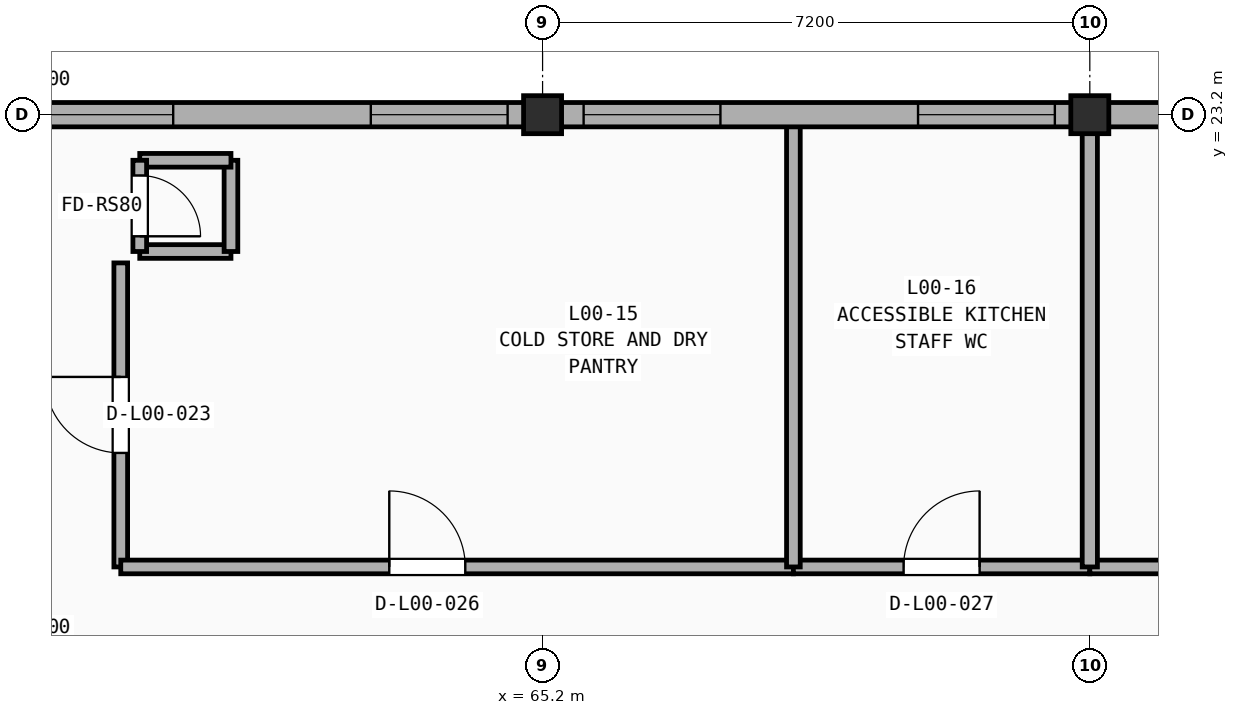
"""IFC4 building model, lengths in metres.
Left out: names, types, materials, properties, quantities, classifications, styles, units other than length and angle.
Written with IfcOpenShell. Run it as: python <this file> out.ifc"""

import sys

from ifc_helpers import new_model, si_unit, direction, frame, frame_2d, origin, origin_2d, place, context, subcontext, project, spatial, rectangle, extrude, element, fill, save


model = new_model("IFC4")
c1 = context("Model", 3, precision=1e-05, world=origin(), true_north=direction((0.0, 1.0)))
c2 = subcontext(c1, "Body", "Model", "MODEL_VIEW")
j1 = project(units=[si_unit("LENGTHUNIT", "METRE"), si_unit("PLANEANGLEUNIT", "RADIAN")], contexts=[c1])
p1 = place(None, origin())
s1 = spatial("IfcSite", under=j1, at=p1, CompositionType="ELEMENT")
p2 = place(p1, origin())
s2 = spatial("IfcBuilding", under=s1, at=p2, CompositionType="ELEMENT")
p3 = place(p2, origin())
s3 = spatial("IfcBuildingStorey", under=s2, at=p3, CompositionType="ELEMENT", Elevation=0.0)
for number, where, z_axis, x_axis in (
    (1, (65.2, 23.2, 0.0), (0.0, 0.0, 1.0), (1.0, 0.0, 0.0)),
    (2, (72.4, 23.2, 0.0), (0.0, 0.0, 1.0), (1.0, 0.0, 0.0)),
):
    element("IfcColumn", number, at=place(p3, frame(where, z_axis=z_axis, x_axis=x_axis)), inside=s3, PredefinedType="COLUMN", context=c2, shape_type="SweptSolid", body=[
        extrude(rectangle(XDim=0.5, YDim=0.5, at=origin_2d()), origin(), (0.0, 0.0, 1.0), 5.4),
    ])
p4 = place(p3, frame((59.65, 17.25, 0.0), z_axis=(0.0, 0.0, 1.0), x_axis=(0.0, 1.0, 0.0)))
e3 = element("IfcWall", 3, at=p4, inside=s3, PredefinedType="PARTITIONING", context=c2, shape_type="SweptSolid", body=[
    extrude(rectangle(XDim=4.0, YDim=0.18, at=frame_2d((2.0, 0.0))), origin(), (0.0, 0.0, 1.0), 5.04),
])
p5 = place(p4, frame((1.5, 0.0, -0.01)))
e4 = element("IfcOpeningElement", 4, at=p5, cuts=e3, PredefinedType="OPENING", context=c2, shape_type="SweptSolid", body=[
    extrude(rectangle(XDim=1.0, YDim=2.16, at=frame_2d((0.5, 1.08))), frame((0.0, 0.1, 0.0), z_axis=(0.0, -1.0, 0.0), x_axis=(1.0, 0.0, 0.0)), (0.0, 0.0, 1.0), 0.2),
])
p6 = place(p3, frame((59.65, 17.25, 0.0), z_axis=(0.0, 0.0, 1.0), x_axis=(1.0, 0.0, 0.0)))
e5 = element("IfcWall", 5, at=p6, inside=s3, PredefinedType="PARTITIONING", context=c2, shape_type="SweptSolid", body=[
    extrude(rectangle(XDim=8.85, YDim=0.18, at=frame_2d((4.425, 0.0))), origin(), (0.0, 0.0, 1.0), 4.39),
])
p7 = place(p6, frame((3.533, 0.0, -0.01)))
e6 = element("IfcOpeningElement", 6, at=p7, cuts=e5, PredefinedType="OPENING", context=c2, shape_type="SweptSolid", body=[
    extrude(rectangle(XDim=1.0, YDim=2.16, at=frame_2d((0.5, 1.08))), frame((0.0, 0.1, 0.0), z_axis=(0.0, -1.0, 0.0), x_axis=(1.0, 0.0, 0.0)), (0.0, 0.0, 1.0), 0.2),
])
p8 = place(p3, frame((68.5, 17.25, 0.0), z_axis=(0.0, 0.0, 1.0), x_axis=(1.0, 0.0, 0.0)))
e7 = element("IfcWall", 7, at=p8, inside=s3, PredefinedType="PARTITIONING", context=c2, shape_type="SweptSolid", body=[
    extrude(rectangle(XDim=3.9, YDim=0.18, at=frame_2d((1.95, 0.0))), origin(), (0.0, 0.0, 1.0), 4.39),
])
p9 = place(p8, frame((1.45, 0.0, -0.01)))
e8 = element("IfcOpeningElement", 8, at=p9, cuts=e7, PredefinedType="OPENING", context=c2, shape_type="SweptSolid", body=[
    extrude(rectangle(XDim=1.0, YDim=2.16, at=frame_2d((0.5, 1.08))), frame((0.0, 0.1, 0.0), z_axis=(0.0, -1.0, 0.0), x_axis=(1.0, 0.0, 0.0)), (0.0, 0.0, 1.0), 0.2),
])
p10 = place(p3, frame((72.4, 17.25, 0.0), z_axis=(0.0, 0.0, 1.0), x_axis=(1.0, 0.0, 0.0)))
e9 = element("IfcWall", 9, at=p10, inside=s3, PredefinedType="PARTITIONING", context=c2, shape_type="SweptSolid", body=[
    extrude(rectangle(XDim=14.55, YDim=0.18, at=frame_2d((7.275, 0.0))), origin(), (0.0, 0.0, 1.0), 4.39),
])
p11 = place(p10, frame((5.34, 0.0, -0.01)))
e10 = element("IfcOpeningElement", 10, at=p11, cuts=e9, PredefinedType="OPENING", context=c2, shape_type="SweptSolid", body=[
    extrude(rectangle(XDim=1.2, YDim=2.21, at=frame_2d((0.6, 1.105))), frame((0.0, 0.1, 0.0), z_axis=(0.0, -1.0, 0.0), x_axis=(1.0, 0.0, 0.0)), (0.0, 0.0, 1.0), 0.2),
])
p12 = place(p3, frame((68.5, 17.25, 0.0), z_axis=(0.0, 0.0, 1.0), x_axis=(0.0, 1.0, 0.0)))
e11 = element("IfcWall", 11, at=p12, inside=s3, PredefinedType="PARTITIONING", context=c2, shape_type="SweptSolid", body=[
    extrude(rectangle(XDim=5.8, YDim=0.18, at=frame_2d((2.9, 0.0))), origin(), (0.0, 0.0, 1.0), 4.64),
])
p13 = place(p3, frame((72.4, 17.25, 0.0), z_axis=(0.0, 0.0, 1.0), x_axis=(0.0, 1.0, 0.0)))
e12 = element("IfcWall", 12, at=p13, inside=s3, PredefinedType="PARTITIONING", context=c2, shape_type="SweptSolid", body=[
    extrude(rectangle(XDim=5.8, YDim=0.2, at=frame_2d((2.9, 0.0))), origin(), (0.0, 0.0, 1.0), 4.39),
])
p14 = place(p3, frame((65.2, 23.2, 0.0), z_axis=(0.0, 0.0, 1.0), x_axis=(-1.0, 0.0, 0.0)))
e13 = element("IfcWall", 13, at=p14, inside=s3, PredefinedType="SOLIDWALL", context=c2, shape_type="SweptSolid", body=[
    extrude(rectangle(XDim=7.2, YDim=0.32, at=frame_2d((3.6, 0.0))), origin(), (0.0, 0.0, 1.0), 4.39),
])
p15 = place(p14, frame((0.46, 0.0, 0.9)))
e14 = element("IfcOpeningElement", 14, at=p15, cuts=e13, PredefinedType="OPENING", context=c2, shape_type="SweptSolid", body=[
    extrude(rectangle(XDim=1.8, YDim=2.2, at=frame_2d((0.9, 1.1))), frame((0.0, 0.17, 0.0), z_axis=(0.0, -1.0, 0.0), x_axis=(1.0, 0.0, 0.0)), (0.0, 0.0, 1.0), 0.34),
])
p16 = place(p14, frame((4.86, 0.0, 0.9)))
e15 = element("IfcOpeningElement", 15, at=p16, cuts=e13, PredefinedType="OPENING", context=c2, shape_type="SweptSolid", body=[
    extrude(rectangle(XDim=1.8, YDim=2.2, at=frame_2d((0.9, 1.1))), frame((0.0, 0.17, 0.0), z_axis=(0.0, -1.0, 0.0), x_axis=(1.0, 0.0, 0.0)), (0.0, 0.0, 1.0), 0.34),
])
p17 = place(p3, frame((72.4, 23.2, 0.0), z_axis=(0.0, 0.0, 1.0), x_axis=(-1.0, 0.0, 0.0)))
e16 = element("IfcWall", 16, at=p17, inside=s3, PredefinedType="SOLIDWALL", context=c2, shape_type="SweptSolid", body=[
    extrude(rectangle(XDim=7.2, YDim=0.32, at=frame_2d((3.6, 0.0))), origin(), (0.0, 0.0, 1.0), 4.39),
])
p18 = place(p17, frame((0.46, 0.0, 0.9)))
e17 = element("IfcOpeningElement", 17, at=p18, cuts=e16, PredefinedType="OPENING", context=c2, shape_type="SweptSolid", body=[
    extrude(rectangle(XDim=1.8, YDim=2.2, at=frame_2d((0.9, 1.1))), frame((0.0, 0.17, 0.0), z_axis=(0.0, -1.0, 0.0), x_axis=(1.0, 0.0, 0.0)), (0.0, 0.0, 1.0), 0.34),
])
p19 = place(p17, frame((4.86, 0.0, 0.9)))
e18 = element("IfcOpeningElement", 18, at=p19, cuts=e16, PredefinedType="OPENING", context=c2, shape_type="SweptSolid", body=[
    extrude(rectangle(XDim=1.8, YDim=2.2, at=frame_2d((0.9, 1.1))), frame((0.0, 0.17, 0.0), z_axis=(0.0, -1.0, 0.0), x_axis=(1.0, 0.0, 0.0)), (0.0, 0.0, 1.0), 0.34),
])
p20 = place(p3, frame((79.6, 23.2, 0.0), z_axis=(0.0, 0.0, 1.0), x_axis=(-1.0, 0.0, 0.0)))
e19 = element("IfcWall", 19, at=p20, inside=s3, PredefinedType="SOLIDWALL", context=c2, shape_type="SweptSolid", body=[
    extrude(rectangle(XDim=7.2, YDim=0.32, at=frame_2d((3.6, 0.0))), origin(), (0.0, 0.0, 1.0), 4.39),
])
p21 = place(p20, frame((2.6, 0.0, -0.01)))
e20 = element("IfcOpeningElement", 20, at=p21, cuts=e19, PredefinedType="OPENING", context=c2, shape_type="SweptSolid", body=[
    extrude(rectangle(XDim=2.0, YDim=2.41, at=frame_2d((1.0, 1.205))), frame((0.0, 0.17, 0.0), z_axis=(0.0, -1.0, 0.0), x_axis=(1.0, 0.0, 0.0)), (0.0, 0.0, 1.0), 0.34),
])
for number, where, z_axis, x_axis in (
    (21, (59.9, 21.4, 0.0), (0.0, 0.0, 1.0), (1.0, 0.0, 0.0)),
    (22, (61.1, 21.4, 0.0), (0.0, 0.0, 1.0), (0.0, 1.0, 0.0)),
    (23, (61.1, 22.6, 0.0), (0.0, 0.0, 1.0), (-1.0, 0.0, 0.0)),
):
    element("IfcWall", number, at=place(p3, frame(where, z_axis=z_axis, x_axis=x_axis)), inside=s3, PredefinedType="SOLIDWALL", context=c2, shape_type="SweptSolid", body=[
        extrude(rectangle(XDim=1.2, YDim=0.18, at=frame_2d((0.6, 0.0))), origin(), (0.0, 0.0, 1.0), 5.07),
    ])
p22 = place(p3, frame((59.9, 22.6, 0.0), z_axis=(0.0, 0.0, 1.0), x_axis=(0.0, -1.0, 0.0)))
e24 = element("IfcWall", 24, at=p22, inside=s3, PredefinedType="SOLIDWALL", context=c2, shape_type="SweptSolid", body=[
    extrude(rectangle(XDim=1.2, YDim=0.18, at=frame_2d((0.6, 0.0))), origin(), (0.0, 0.0, 1.0), 5.07),
])
p23 = place(p22, frame((0.2, 0.0, -0.01)))
e25 = element("IfcOpeningElement", 25, at=p23, cuts=e24, PredefinedType="OPENING", context=c2, shape_type="SweptSolid", body=[
    extrude(rectangle(XDim=0.8, YDim=2.06, at=frame_2d((0.4, 1.03))), frame((0.0, 0.1, 0.0), z_axis=(0.0, -1.0, 0.0), x_axis=(1.0, 0.0, 0.0)), (0.0, 0.0, 1.0), 0.2),
])
p24 = place(p5, frame((0.0, 0.0, 0.01)))
e26 = element("IfcDoor", 26, at=p24, inside=s3, OperationType="SINGLE_SWING_RIGHT", PredefinedType="DOOR", context=c2, shape_type="SweptSolid", body=[
    extrude(rectangle(XDim=1.0, YDim=2.15, at=frame_2d((0.5, 1.075))), frame((0.0, 0.025, 0.0), z_axis=(0.0, -1.0, 0.0), x_axis=(1.0, 0.0, 0.0)), (0.0, 0.0, 1.0), 0.05),
])
fill(e4, e26)
p25 = place(p7, frame((0.0, 0.0, 0.01)))
e27 = element("IfcDoor", 27, at=p25, inside=s3, OperationType="SINGLE_SWING_LEFT", PredefinedType="DOOR", context=c2, shape_type="SweptSolid", body=[
    extrude(rectangle(XDim=1.0, YDim=2.15, at=frame_2d((0.5, 1.075))), frame((0.0, 0.025, 0.0), z_axis=(0.0, -1.0, 0.0), x_axis=(1.0, 0.0, 0.0)), (0.0, 0.0, 1.0), 0.05),
])
fill(e6, e27)
p26 = place(p9, frame((1.0, 0.0, 0.01), z_axis=(0.0, 0.0, 1.0), x_axis=(-1.0, 0.0, 0.0)))
e28 = element("IfcDoor", 28, at=p26, inside=s3, OperationType="SINGLE_SWING_RIGHT", PredefinedType="DOOR", context=c2, shape_type="SweptSolid", body=[
    extrude(rectangle(XDim=1.0, YDim=2.15, at=frame_2d((0.5, 1.075))), frame((0.0, 0.025, 0.0), z_axis=(0.0, -1.0, 0.0), x_axis=(1.0, 0.0, 0.0)), (0.0, 0.0, 1.0), 0.05),
])
fill(e8, e28)
p27 = place(p15, origin())
e29 = element("IfcWindow", 29, at=p27, inside=s3, PartitioningType="DOUBLE_PANEL_VERTICAL", PredefinedType="WINDOW", context=c2, shape_type="SweptSolid", body=[
    extrude(rectangle(XDim=1.8, YDim=2.2, at=frame_2d((0.9, 1.1))), frame((0.0, 0.03, 0.0), z_axis=(0.0, -1.0, 0.0), x_axis=(1.0, 0.0, 0.0)), (0.0, 0.0, 1.0), 0.06),
])
fill(e14, e29)
p28 = place(p16, origin())
e30 = element("IfcWindow", 30, at=p28, inside=s3, PartitioningType="DOUBLE_PANEL_VERTICAL", PredefinedType="WINDOW", context=c2, shape_type="SweptSolid", body=[
    extrude(rectangle(XDim=1.8, YDim=2.2, at=frame_2d((0.9, 1.1))), frame((0.0, 0.03, 0.0), z_axis=(0.0, -1.0, 0.0), x_axis=(1.0, 0.0, 0.0)), (0.0, 0.0, 1.0), 0.06),
])
fill(e15, e30)
p29 = place(p18, origin())
e31 = element("IfcWindow", 31, at=p29, inside=s3, PartitioningType="DOUBLE_PANEL_VERTICAL", PredefinedType="WINDOW", context=c2, shape_type="SweptSolid", body=[
    extrude(rectangle(XDim=1.8, YDim=2.2, at=frame_2d((0.9, 1.1))), frame((0.0, 0.03, 0.0), z_axis=(0.0, -1.0, 0.0), x_axis=(1.0, 0.0, 0.0)), (0.0, 0.0, 1.0), 0.06),
])
fill(e17, e31)
p30 = place(p19, origin())
e32 = element("IfcWindow", 32, at=p30, inside=s3, PartitioningType="DOUBLE_PANEL_VERTICAL", PredefinedType="WINDOW", context=c2, shape_type="SweptSolid", body=[
    extrude(rectangle(XDim=1.8, YDim=2.2, at=frame_2d((0.9, 1.1))), frame((0.0, 0.03, 0.0), z_axis=(0.0, -1.0, 0.0), x_axis=(1.0, 0.0, 0.0)), (0.0, 0.0, 1.0), 0.06),
])
fill(e18, e32)
p31 = place(p23, frame((0.0, 0.0, 0.01)))
e33 = element("IfcDoor", 33, at=p31, inside=s3, OperationType="SINGLE_SWING_RIGHT", PredefinedType="DOOR", context=c2, shape_type="SweptSolid", body=[
    extrude(rectangle(XDim=0.8, YDim=2.05, at=frame_2d((0.4, 1.025))), frame((0.0, 0.025, 0.0), z_axis=(0.0, -1.0, 0.0), x_axis=(1.0, 0.0, 0.0)), (0.0, 0.0, 1.0), 0.05),
])
fill(e25, e33)
save(model, sys.argv[1])
